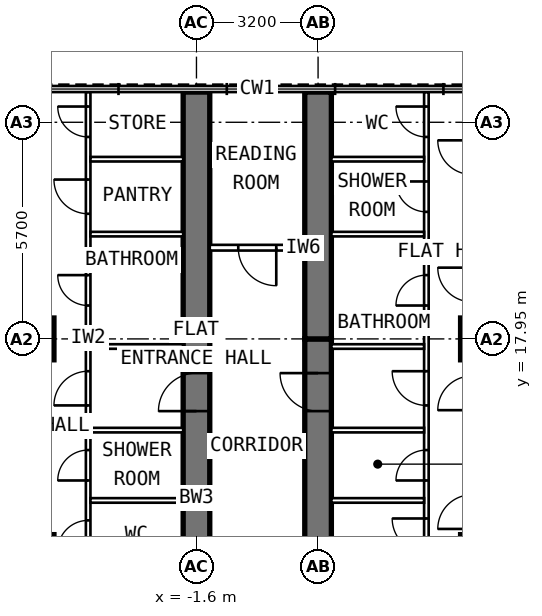
"""IFC4 building model, lengths in metres.
Left out: names, types, materials, properties, quantities, classifications, styles, units other than length and angle.
Written with IfcOpenShell. Run it as: python <this file> out.ifc"""

import sys

from ifc_helpers import new_model, si_unit, direction, frame, frame_2d, origin, origin_2d, place, context, subcontext, project, spatial, rectangle, extrude, element, fill, save


model = new_model("IFC4")
c1 = context("Model", 3, precision=1e-05, world=origin(), true_north=direction((0.0, 1.0)))
c2 = subcontext(c1, "Body", "Model", "MODEL_VIEW")
j1 = project(units=[si_unit("LENGTHUNIT", "METRE"), si_unit("PLANEANGLEUNIT", "RADIAN")], contexts=[c1])
p1 = place(None, origin())
s1 = spatial("IfcSite", under=j1, at=p1, CompositionType="ELEMENT")
p2 = place(p1, origin())
s2 = spatial("IfcBuilding", under=s1, at=p2, CompositionType="ELEMENT")
p3 = place(p2, frame((0.0, 0.0, 204.6)))
s3 = spatial("IfcBuildingStorey", under=s2, at=p3, CompositionType="ELEMENT", Elevation=204.6)
for number, where, z_axis, x_axis in (
    (1, (-5.9, 12.25, 0.0), (0.0, 0.0, 1.0), (0.0, 1.0, 0.0)),
    (2, (-5.9, 17.95, 0.0), (0.0, 0.0, 1.0), (0.0, 1.0, 0.0)),
    (3, (5.9, 12.25, 0.0), (0.0, 0.0, 1.0), (0.0, 1.0, 0.0)),
    (4, (5.9, 17.95, 0.0), (0.0, 0.0, 1.0), (0.0, 1.0, 0.0)),
):
    element("IfcColumn", number, at=place(p3, frame(where, z_axis=z_axis, x_axis=x_axis)), inside=s3, PredefinedType="COLUMN", context=c2, shape_type="SweptSolid", body=[
        extrude(rectangle(XDim=1.1, YDim=1.1, at=origin_2d()), origin(), (0.0, 0.0, 1.0), 3.6),
    ])
p4 = place(p3, frame((-1.6, 9.6, 0.0), z_axis=(0.0, 0.0, 1.0), x_axis=(0.0, 1.0, 0.0)))
e5 = element("IfcWall", 5, at=p4, inside=s3, PredefinedType="SHEAR", context=c2, shape_type="SweptSolid", body=[
    extrude(rectangle(XDim=8.35, YDim=0.7, at=frame_2d((4.175, 0.0))), origin(), (0.0, 0.0, 1.0), 3.6),
])
p5 = place(p4, frame((6.45, 0.0, 0.0)))
e6 = element("IfcOpeningElement", 6, at=p5, cuts=e5, PredefinedType="OPENING", context=c2, shape_type="SweptSolid", body=[
    extrude(rectangle(XDim=1.0, YDim=2.1, at=frame_2d((0.5, 1.05))), frame((0.0, 0.362, 0.0), z_axis=(0.0, -1.0, 0.0), x_axis=(1.0, 0.0, 0.0)), (0.0, 0.0, 1.0), 0.724),
])
p6 = place(p3, frame((-1.6, 17.95, 0.0), z_axis=(0.0, 0.0, 1.0), x_axis=(0.0, 1.0, 0.0)))
e7 = element("IfcWall", 7, at=p6, inside=s3, PredefinedType="SHEAR", context=c2, shape_type="SweptSolid", body=[
    extrude(rectangle(XDim=6.495, YDim=0.7, at=frame_2d((3.248, 0.0))), origin(), (0.0, 0.0, 1.0), 3.6),
])
p7 = place(p3, frame((1.6, 9.6, 0.0), z_axis=(0.0, 0.0, 1.0), x_axis=(0.0, 1.0, 0.0)))
e8 = element("IfcWall", 8, at=p7, inside=s3, PredefinedType="SHEAR", context=c2, shape_type="SweptSolid", body=[
    extrude(rectangle(XDim=8.35, YDim=0.7, at=frame_2d((4.175, 0.0))), origin(), (0.0, 0.0, 1.0), 3.6),
])
p8 = place(p7, frame((6.45, 0.0, 0.0)))
e9 = element("IfcOpeningElement", 9, at=p8, cuts=e8, PredefinedType="OPENING", context=c2, shape_type="SweptSolid", body=[
    extrude(rectangle(XDim=1.0, YDim=2.1, at=frame_2d((0.5, 1.05))), frame((0.0, 0.362, 0.0), z_axis=(0.0, -1.0, 0.0), x_axis=(1.0, 0.0, 0.0)), (0.0, 0.0, 1.0), 0.724),
])
p9 = place(p3, frame((1.6, 17.95, 0.0), z_axis=(0.0, 0.0, 1.0), x_axis=(0.0, 1.0, 0.0)))
e10 = element("IfcWall", 10, at=p9, inside=s3, PredefinedType="SHEAR", context=c2, shape_type="SweptSolid", body=[
    extrude(rectangle(XDim=6.495, YDim=0.7, at=frame_2d((3.248, 0.0))), origin(), (0.0, 0.0, 1.0), 3.6),
])
p10 = place(p3, frame((-4.45, 9.925, 0.0), z_axis=(0.0, 0.0, 1.0), x_axis=(0.0, 1.0, 0.0)))
e11 = element("IfcWall", 11, at=p10, inside=s3, PredefinedType="PARTITIONING", context=c2, shape_type="SweptSolid", body=[
    extrude(rectangle(XDim=14.52, YDim=0.12, at=frame_2d((7.26, 0.0))), origin(), (0.0, 0.0, 1.0), 3.35),
])
p11 = place(p10, frame((0.55, 0.0, 0.0)))
e12 = element("IfcOpeningElement", 12, at=p11, cuts=e11, PredefinedType="OPENING", context=c2, shape_type="SweptSolid", body=[
    extrude(rectangle(XDim=0.9, YDim=2.1, at=frame_2d((0.45, 1.05))), frame((0.0, 0.072, 0.0), z_axis=(0.0, -1.0, 0.0), x_axis=(1.0, 0.0, 0.0)), (0.0, 0.0, 1.0), 0.144),
])
p12 = place(p10, frame((2.45, 0.0, 0.0)))
e13 = element("IfcOpeningElement", 13, at=p12, cuts=e11, PredefinedType="OPENING", context=c2, shape_type="SweptSolid", body=[
    extrude(rectangle(XDim=0.8, YDim=2.1, at=frame_2d((0.4, 1.05))), frame((0.0, 0.072, 0.0), z_axis=(0.0, -1.0, 0.0), x_axis=(1.0, 0.0, 0.0)), (0.0, 0.0, 1.0), 0.144),
])
p13 = place(p10, frame((4.3, 0.0, 0.0)))
e14 = element("IfcOpeningElement", 14, at=p13, cuts=e11, PredefinedType="OPENING", context=c2, shape_type="SweptSolid", body=[
    extrude(rectangle(XDim=0.8, YDim=2.1, at=frame_2d((0.4, 1.05))), frame((0.0, 0.072, 0.0), z_axis=(0.0, -1.0, 0.0), x_axis=(1.0, 0.0, 0.0)), (0.0, 0.0, 1.0), 0.144),
])
p14 = place(p10, frame((6.275, 0.0, 0.0)))
e15 = element("IfcOpeningElement", 15, at=p14, cuts=e11, PredefinedType="OPENING", context=c2, shape_type="SweptSolid", body=[
    extrude(rectangle(XDim=0.9, YDim=2.1, at=frame_2d((0.45, 1.05))), frame((0.0, 0.072, 0.0), z_axis=(0.0, -1.0, 0.0), x_axis=(1.0, 0.0, 0.0)), (0.0, 0.0, 1.0), 0.144),
])
p15 = place(p10, frame((8.904, 0.0, 0.0)))
e16 = element("IfcOpeningElement", 16, at=p15, cuts=e11, PredefinedType="OPENING", context=c2, shape_type="SweptSolid", body=[
    extrude(rectangle(XDim=0.8, YDim=2.1, at=frame_2d((0.4, 1.05))), frame((0.0, 0.072, 0.0), z_axis=(0.0, -1.0, 0.0), x_axis=(1.0, 0.0, 0.0)), (0.0, 0.0, 1.0), 0.144),
])
p16 = place(p10, frame((11.318, 0.0, 0.0)))
e17 = element("IfcOpeningElement", 17, at=p16, cuts=e11, PredefinedType="OPENING", context=c2, shape_type="SweptSolid", body=[
    extrude(rectangle(XDim=0.9, YDim=2.1, at=frame_2d((0.45, 1.05))), frame((0.0, 0.072, 0.0), z_axis=(0.0, -1.0, 0.0), x_axis=(1.0, 0.0, 0.0)), (0.0, 0.0, 1.0), 0.144),
])
p17 = place(p10, frame((13.339, 0.0, 0.0)))
e18 = element("IfcOpeningElement", 18, at=p17, cuts=e11, PredefinedType="OPENING", context=c2, shape_type="SweptSolid", body=[
    extrude(rectangle(XDim=0.8, YDim=2.1, at=frame_2d((0.4, 1.05))), frame((0.0, 0.072, 0.0), z_axis=(0.0, -1.0, 0.0), x_axis=(1.0, 0.0, 0.0)), (0.0, 0.0, 1.0), 0.144),
])
for number, where, z_axis, x_axis in (
    (19, (-1.95, 13.7, 0.0), (0.0, 0.0, 1.0), (-1.0, 0.0, 0.0)),
    (20, (-1.95, 15.55, 0.0), (0.0, 0.0, 1.0), (-1.0, 0.0, 0.0)),
):
    element("IfcWall", number, at=place(p3, frame(where, z_axis=z_axis, x_axis=x_axis)), inside=s3, PredefinedType="PARTITIONING", context=c2, shape_type="SweptSolid", body=[
        extrude(rectangle(XDim=2.44, YDim=0.12, at=frame_2d((1.22, 0.0))), origin(), (0.0, 0.0, 1.0), 3.35),
    ])
p18 = place(p3, frame((-1.95, 17.75, 0.0), z_axis=(0.0, 0.0, 1.0), x_axis=(-1.0, 0.0, 0.0)))
e21 = element("IfcWall", 21, at=p18, inside=s3, PredefinedType="PARTITIONING", context=c2, shape_type="SweptSolid", body=[
    extrude(rectangle(XDim=2.44, YDim=0.12, at=frame_2d((1.22, 0.0))), origin(), (0.0, 0.0, 1.0), 2.45),
])
for number, where, z_axis, x_axis in (
    (22, (-1.95, 20.707, 0.0), (0.0, 0.0, 1.0), (-1.0, 0.0, 0.0)),
    (23, (-1.95, 22.678, 0.0), (0.0, 0.0, 1.0), (-1.0, 0.0, 0.0)),
):
    element("IfcWall", number, at=place(p3, frame(where, z_axis=z_axis, x_axis=x_axis)), inside=s3, PredefinedType="PARTITIONING", context=c2, shape_type="SweptSolid", body=[
        extrude(rectangle(XDim=2.44, YDim=0.12, at=frame_2d((1.22, 0.0))), origin(), (0.0, 0.0, 1.0), 3.35),
    ])
p19 = place(p3, frame((4.45, 9.925, 0.0), z_axis=(0.0, 0.0, 1.0), x_axis=(0.0, 1.0, 0.0)))
e24 = element("IfcWall", 24, at=p19, inside=s3, PredefinedType="PARTITIONING", context=c2, shape_type="SweptSolid", body=[
    extrude(rectangle(XDim=14.52, YDim=0.12, at=frame_2d((7.26, 0.0))), origin(), (0.0, 0.0, 1.0), 3.35),
])
p20 = place(p19, frame((0.6, 0.0, 0.0)))
e25 = element("IfcOpeningElement", 25, at=p20, cuts=e24, PredefinedType="OPENING", context=c2, shape_type="SweptSolid", body=[
    extrude(rectangle(XDim=0.8, YDim=2.1, at=frame_2d((0.4, 1.05))), frame((0.0, 0.072, 0.0), z_axis=(0.0, -1.0, 0.0), x_axis=(1.0, 0.0, 0.0)), (0.0, 0.0, 1.0), 0.144),
])
p21 = place(p19, frame((2.4, 0.0, 0.0)))
e26 = element("IfcOpeningElement", 26, at=p21, cuts=e24, PredefinedType="OPENING", context=c2, shape_type="SweptSolid", body=[
    extrude(rectangle(XDim=0.9, YDim=2.1, at=frame_2d((0.45, 1.05))), frame((0.0, 0.072, 0.0), z_axis=(0.0, -1.0, 0.0), x_axis=(1.0, 0.0, 0.0)), (0.0, 0.0, 1.0), 0.144),
])
p22 = place(p19, frame((4.3, 0.0, 0.0)))
e27 = element("IfcOpeningElement", 27, at=p22, cuts=e24, PredefinedType="OPENING", context=c2, shape_type="SweptSolid", body=[
    extrude(rectangle(XDim=0.8, YDim=2.1, at=frame_2d((0.4, 1.05))), frame((0.0, 0.072, 0.0), z_axis=(0.0, -1.0, 0.0), x_axis=(1.0, 0.0, 0.0)), (0.0, 0.0, 1.0), 0.144),
])
p23 = place(p19, frame((6.275, 0.0, 0.0)))
e28 = element("IfcOpeningElement", 28, at=p23, cuts=e24, PredefinedType="OPENING", context=c2, shape_type="SweptSolid", body=[
    extrude(rectangle(XDim=0.9, YDim=2.1, at=frame_2d((0.45, 1.05))), frame((0.0, 0.072, 0.0), z_axis=(0.0, -1.0, 0.0), x_axis=(1.0, 0.0, 0.0)), (0.0, 0.0, 1.0), 0.144),
])
p24 = place(p19, frame((8.904, 0.0, 0.0)))
e29 = element("IfcOpeningElement", 29, at=p24, cuts=e24, PredefinedType="OPENING", context=c2, shape_type="SweptSolid", body=[
    extrude(rectangle(XDim=0.8, YDim=2.1, at=frame_2d((0.4, 1.05))), frame((0.0, 0.072, 0.0), z_axis=(0.0, -1.0, 0.0), x_axis=(1.0, 0.0, 0.0)), (0.0, 0.0, 1.0), 0.144),
])
p25 = place(p19, frame((11.368, 0.0, 0.0)))
e30 = element("IfcOpeningElement", 30, at=p25, cuts=e24, PredefinedType="OPENING", context=c2, shape_type="SweptSolid", body=[
    extrude(rectangle(XDim=0.8, YDim=2.1, at=frame_2d((0.4, 1.05))), frame((0.0, 0.072, 0.0), z_axis=(0.0, -1.0, 0.0), x_axis=(1.0, 0.0, 0.0)), (0.0, 0.0, 1.0), 0.144),
])
p26 = place(p19, frame((13.339, 0.0, 0.0)))
e31 = element("IfcOpeningElement", 31, at=p26, cuts=e24, PredefinedType="OPENING", context=c2, shape_type="SweptSolid", body=[
    extrude(rectangle(XDim=0.8, YDim=2.1, at=frame_2d((0.4, 1.05))), frame((0.0, 0.072, 0.0), z_axis=(0.0, -1.0, 0.0), x_axis=(1.0, 0.0, 0.0)), (0.0, 0.0, 1.0), 0.144),
])
for number, where, z_axis, x_axis in (
    (32, (1.95, 13.7, 0.0), (0.0, 0.0, 1.0), (1.0, 0.0, 0.0)),
    (33, (1.95, 15.55, 0.0), (0.0, 0.0, 1.0), (1.0, 0.0, 0.0)),
):
    element("IfcWall", number, at=place(p3, frame(where, z_axis=z_axis, x_axis=x_axis)), inside=s3, PredefinedType="PARTITIONING", context=c2, shape_type="SweptSolid", body=[
        extrude(rectangle(XDim=2.44, YDim=0.12, at=frame_2d((1.22, 0.0))), origin(), (0.0, 0.0, 1.0), 3.35),
    ])
p27 = place(p3, frame((1.95, 17.75, 0.0), z_axis=(0.0, 0.0, 1.0), x_axis=(1.0, 0.0, 0.0)))
e34 = element("IfcWall", 34, at=p27, inside=s3, PredefinedType="PARTITIONING", context=c2, shape_type="SweptSolid", body=[
    extrude(rectangle(XDim=2.44, YDim=0.12, at=frame_2d((1.22, 0.0))), origin(), (0.0, 0.0, 1.0), 2.45),
])
for number, where, z_axis, x_axis in (
    (35, (1.95, 20.707, 0.0), (0.0, 0.0, 1.0), (1.0, 0.0, 0.0)),
    (36, (1.95, 22.678, 0.0), (0.0, 0.0, 1.0), (1.0, 0.0, 0.0)),
):
    element("IfcWall", number, at=place(p3, frame(where, z_axis=z_axis, x_axis=x_axis)), inside=s3, PredefinedType="PARTITIONING", context=c2, shape_type="SweptSolid", body=[
        extrude(rectangle(XDim=2.44, YDim=0.12, at=frame_2d((1.22, 0.0))), origin(), (0.0, 0.0, 1.0), 3.35),
    ])
p28 = place(p3, frame((1.25, 20.35, 0.0), z_axis=(0.0, 0.0, 1.0), x_axis=(-1.0, 0.0, 0.0)))
e37 = element("IfcWall", 37, at=p28, inside=s3, PredefinedType="PARTITIONING", context=c2, shape_type="SweptSolid", body=[
    extrude(rectangle(XDim=2.5, YDim=0.15, at=frame_2d((1.25, 0.0))), origin(), (0.0, 0.0, 1.0), 3.35),
])
p29 = place(p28, frame((0.75, 0.0, 0.0)))
e38 = element("IfcOpeningElement", 38, at=p29, cuts=e37, PredefinedType="OPENING", context=c2, shape_type="SweptSolid", body=[
    extrude(rectangle(XDim=1.0, YDim=2.1, at=frame_2d((0.5, 1.05))), frame((0.0, 0.087, 0.0), z_axis=(0.0, -1.0, 0.0), x_axis=(1.0, 0.0, 0.0)), (0.0, 0.0, 1.0), 0.174),
])
p30 = place(p5, origin())
e39 = element("IfcDoor", 39, at=p30, inside=s3, OperationType="SINGLE_SWING_LEFT", PredefinedType="DOOR", context=c2, shape_type="SweptSolid", body=[
    extrude(rectangle(XDim=1.0, YDim=2.1, at=frame_2d((0.5, 1.05))), frame((0.0, 0.1, 0.0), z_axis=(0.0, -1.0, 0.0), x_axis=(1.0, 0.0, 0.0)), (0.0, 0.0, 1.0), 0.2),
])
fill(e6, e39)
p31 = place(p12, origin())
e40 = element("IfcDoor", 40, at=p31, inside=s3, OperationType="SINGLE_SWING_LEFT", PredefinedType="DOOR", context=c2, shape_type="SweptSolid", body=[
    extrude(rectangle(XDim=0.8, YDim=2.1, at=frame_2d((0.4, 1.05))), frame((0.0, 0.025, 0.0), z_axis=(0.0, -1.0, 0.0), x_axis=(1.0, 0.0, 0.0)), (0.0, 0.0, 1.0), 0.05),
])
fill(e13, e40)
p32 = place(p13, origin())
e41 = element("IfcDoor", 41, at=p32, inside=s3, OperationType="SINGLE_SWING_LEFT", PredefinedType="DOOR", context=c2, shape_type="SweptSolid", body=[
    extrude(rectangle(XDim=0.8, YDim=2.1, at=frame_2d((0.4, 1.05))), frame((0.0, 0.025, 0.0), z_axis=(0.0, -1.0, 0.0), x_axis=(1.0, 0.0, 0.0)), (0.0, 0.0, 1.0), 0.05),
])
fill(e14, e41)
p33 = place(p14, origin())
e42 = element("IfcDoor", 42, at=p33, inside=s3, OperationType="SINGLE_SWING_LEFT", PredefinedType="DOOR", context=c2, shape_type="SweptSolid", body=[
    extrude(rectangle(XDim=0.9, YDim=2.1, at=frame_2d((0.45, 1.05))), frame((0.0, 0.025, 0.0), z_axis=(0.0, -1.0, 0.0), x_axis=(1.0, 0.0, 0.0)), (0.0, 0.0, 1.0), 0.05),
])
fill(e15, e42)
p34 = place(p15, origin())
e43 = element("IfcDoor", 43, at=p34, inside=s3, OperationType="SINGLE_SWING_RIGHT", PredefinedType="DOOR", context=c2, shape_type="SweptSolid", body=[
    extrude(rectangle(XDim=0.8, YDim=2.1, at=frame_2d((0.4, 1.05))), frame((0.0, 0.025, 0.0), z_axis=(0.0, -1.0, 0.0), x_axis=(1.0, 0.0, 0.0)), (0.0, 0.0, 1.0), 0.05),
])
fill(e16, e43)
p35 = place(p16, origin())
e44 = element("IfcDoor", 44, at=p35, inside=s3, OperationType="SINGLE_SWING_RIGHT", PredefinedType="DOOR", context=c2, shape_type="SweptSolid", body=[
    extrude(rectangle(XDim=0.9, YDim=2.1, at=frame_2d((0.45, 1.05))), frame((0.0, 0.025, 0.0), z_axis=(0.0, -1.0, 0.0), x_axis=(1.0, 0.0, 0.0)), (0.0, 0.0, 1.0), 0.05),
])
fill(e17, e44)
p36 = place(p17, origin())
e45 = element("IfcDoor", 45, at=p36, inside=s3, OperationType="SINGLE_SWING_RIGHT", PredefinedType="DOOR", context=c2, shape_type="SweptSolid", body=[
    extrude(rectangle(XDim=0.8, YDim=2.1, at=frame_2d((0.4, 1.05))), frame((0.0, 0.025, 0.0), z_axis=(0.0, -1.0, 0.0), x_axis=(1.0, 0.0, 0.0)), (0.0, 0.0, 1.0), 0.05),
])
fill(e18, e45)
p37 = place(p8, origin())
e46 = element("IfcDoor", 46, at=p37, inside=s3, OperationType="SINGLE_SWING_RIGHT", PredefinedType="DOOR", context=c2, shape_type="SweptSolid", body=[
    extrude(rectangle(XDim=1.0, YDim=2.1, at=frame_2d((0.5, 1.05))), frame((0.0, 0.1, 0.0), z_axis=(0.0, -1.0, 0.0), x_axis=(1.0, 0.0, 0.0)), (0.0, 0.0, 1.0), 0.2),
])
fill(e9, e46)
p38 = place(p21, origin())
e47 = element("IfcDoor", 47, at=p38, inside=s3, OperationType="SINGLE_SWING_RIGHT", PredefinedType="DOOR", context=c2, shape_type="SweptSolid", body=[
    extrude(rectangle(XDim=0.9, YDim=2.1, at=frame_2d((0.45, 1.05))), frame((0.0, 0.025, 0.0), z_axis=(0.0, -1.0, 0.0), x_axis=(1.0, 0.0, 0.0)), (0.0, 0.0, 1.0), 0.05),
])
fill(e26, e47)
p39 = place(p22, origin())
e48 = element("IfcDoor", 48, at=p39, inside=s3, OperationType="SINGLE_SWING_LEFT", PredefinedType="DOOR", context=c2, shape_type="SweptSolid", body=[
    extrude(rectangle(XDim=0.8, YDim=2.1, at=frame_2d((0.4, 1.05))), frame((0.0, 0.025, 0.0), z_axis=(0.0, -1.0, 0.0), x_axis=(1.0, 0.0, 0.0)), (0.0, 0.0, 1.0), 0.05),
])
fill(e27, e48)
p40 = place(p23, origin())
e49 = element("IfcDoor", 49, at=p40, inside=s3, OperationType="SINGLE_SWING_RIGHT", PredefinedType="DOOR", context=c2, shape_type="SweptSolid", body=[
    extrude(rectangle(XDim=0.9, YDim=2.1, at=frame_2d((0.45, 1.05))), frame((0.0, 0.025, 0.0), z_axis=(0.0, -1.0, 0.0), x_axis=(1.0, 0.0, 0.0)), (0.0, 0.0, 1.0), 0.05),
])
fill(e28, e49)
p41 = place(p24, origin())
e50 = element("IfcDoor", 50, at=p41, inside=s3, OperationType="SINGLE_SWING_LEFT", PredefinedType="DOOR", context=c2, shape_type="SweptSolid", body=[
    extrude(rectangle(XDim=0.8, YDim=2.1, at=frame_2d((0.4, 1.05))), frame((0.0, 0.025, 0.0), z_axis=(0.0, -1.0, 0.0), x_axis=(1.0, 0.0, 0.0)), (0.0, 0.0, 1.0), 0.05),
])
fill(e29, e50)
p42 = place(p25, origin())
e51 = element("IfcDoor", 51, at=p42, inside=s3, OperationType="SINGLE_SWING_RIGHT", PredefinedType="DOOR", context=c2, shape_type="SweptSolid", body=[
    extrude(rectangle(XDim=0.8, YDim=2.1, at=frame_2d((0.4, 1.05))), frame((0.0, 0.025, 0.0), z_axis=(0.0, -1.0, 0.0), x_axis=(1.0, 0.0, 0.0)), (0.0, 0.0, 1.0), 0.05),
])
fill(e30, e51)
p43 = place(p26, origin())
e52 = element("IfcDoor", 52, at=p43, inside=s3, OperationType="SINGLE_SWING_RIGHT", PredefinedType="DOOR", context=c2, shape_type="SweptSolid", body=[
    extrude(rectangle(XDim=0.8, YDim=2.1, at=frame_2d((0.4, 1.05))), frame((0.0, 0.025, 0.0), z_axis=(0.0, -1.0, 0.0), x_axis=(1.0, 0.0, 0.0)), (0.0, 0.0, 1.0), 0.05),
])
fill(e31, e52)
p44 = place(p29, origin())
e53 = element("IfcDoor", 53, at=p44, inside=s3, OperationType="SINGLE_SWING_LEFT", PredefinedType="DOOR", context=c2, shape_type="SweptSolid", body=[
    extrude(rectangle(XDim=1.0, YDim=2.1, at=frame_2d((0.5, 1.05))), frame((0.0, 0.025, 0.0), z_axis=(0.0, -1.0, 0.0), x_axis=(1.0, 0.0, 0.0)), (0.0, 0.0, 1.0), 0.05),
])
fill(e38, e53)
save(model, sys.argv[1])
